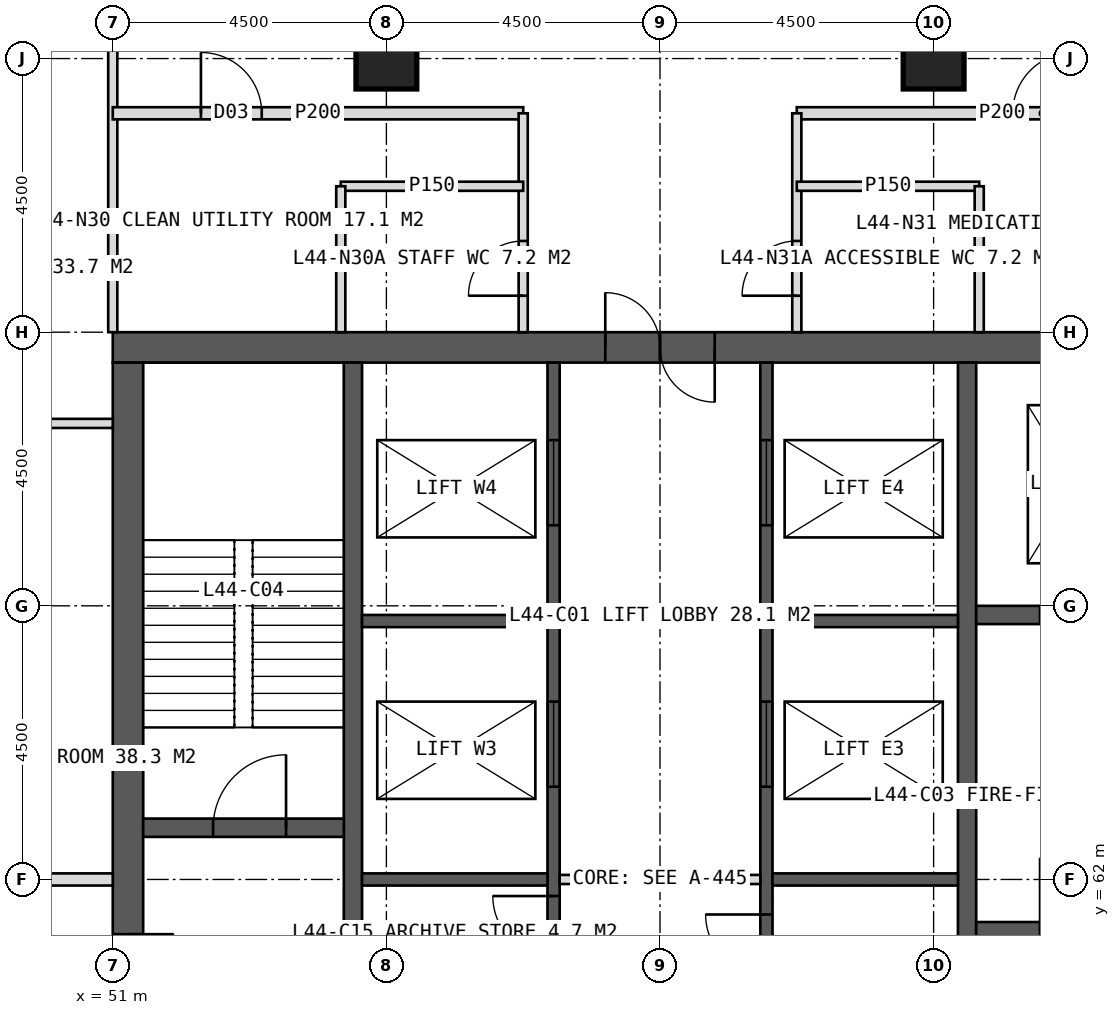
"""IFC4 building model, lengths in metres.
Left out: names, types, materials, properties, quantities, classifications, styles, units other than length and angle.
Written with IfcOpenShell. Run it as: python <this file> out.ifc"""

import sys

from ifc_helpers import new_model, si_unit, direction, frame, frame_2d, origin, origin_2d, place, context, subcontext, project, spatial, rectangle, hollow_rectangle, extrude, element, fill, save


model = new_model("IFC4")
c1 = context("Model", 3, precision=1e-05, world=origin(), true_north=direction((0.0, 1.0)))
c2 = subcontext(c1, "Body", "Model", "MODEL_VIEW")
j1 = project(units=[si_unit("LENGTHUNIT", "METRE"), si_unit("PLANEANGLEUNIT", "RADIAN")], contexts=[c1])
p1 = place(None, origin())
s1 = spatial("IfcSite", under=j1, at=p1, CompositionType="ELEMENT")
p2 = place(p1, origin())
s2 = spatial("IfcBuilding", under=s1, at=p2, CompositionType="ELEMENT")
p3 = place(p2, frame((0.0, 0.0, 185.0)))
s3 = spatial("IfcBuildingStorey", under=s2, at=p3, CompositionType="ELEMENT", Elevation=185.0)
p4 = place(p3, frame((51.0, 70.75, 0.0), z_axis=(0.0, 0.0, 1.0), x_axis=(1.0, 0.0, 0.0)))
e1 = element("IfcWall", 1, at=p4, inside=s3, PredefinedType="SHEAR", context=c2, shape_type="SweptSolid", body=[
    extrude(rectangle(XDim=18.0, YDim=0.5, at=frame_2d((9.0, 0.0))), origin(), (0.0, 0.0, 1.0), 4.0),
])
p5 = place(p4, frame((8.1, 0.0, 0.0)))
e2 = element("IfcOpeningElement", 2, at=p5, cuts=e1, PredefinedType="OPENING", context=c2, shape_type="SweptSolid", body=[
    extrude(rectangle(XDim=1.8, YDim=2.2, at=frame_2d((0.9, 1.1))), frame((0.0, 0.26, 0.0), z_axis=(0.0, -1.0, 0.0), x_axis=(1.0, 0.0, 0.0)), (0.0, 0.0, 1.0), 0.52),
])
p6 = place(p3, frame((51.25, 53.5, 0.0), z_axis=(0.0, 0.0, 1.0), x_axis=(0.0, 1.0, 0.0)))
e3 = element("IfcWall", 3, at=p6, inside=s3, PredefinedType="SHEAR", context=c2, shape_type="SweptSolid", body=[
    extrude(rectangle(XDim=17.0, YDim=0.5, at=frame_2d((8.5, 0.0))), origin(), (0.0, 0.0, 1.0), 4.0),
])
p7 = place(p6, frame((6.1, 0.0, 0.0)))
e4 = element("IfcOpeningElement", 4, at=p7, cuts=e3, PredefinedType="OPENING", context=c2, shape_type="SweptSolid", body=[
    extrude(rectangle(XDim=1.5, YDim=2.2, at=frame_2d((0.75, 1.1))), frame((0.0, 0.26, 0.0), z_axis=(0.0, -1.0, 0.0), x_axis=(1.0, 0.0, 0.0)), (0.0, 0.0, 1.0), 0.52),
])
for number, where, z_axis, x_axis in (
    (5, (54.95, 53.5, 0.0), (0.0, 0.0, 1.0), (0.0, 1.0, 0.0)),
    (6, (65.05, 53.5, 0.0), (0.0, 0.0, 1.0), (0.0, 1.0, 0.0)),
):
    element("IfcWall", number, at=place(p3, frame(where, z_axis=z_axis, x_axis=x_axis)), inside=s3, PredefinedType="SHEAR", context=c2, shape_type="SweptSolid", body=[
        extrude(rectangle(XDim=17.0, YDim=0.3, at=frame_2d((8.5, 0.0))), origin(), (0.0, 0.0, 1.0), 4.0),
    ])
p8 = place(p3, frame((58.25, 53.5, 0.0), z_axis=(0.0, 0.0, 1.0), x_axis=(0.0, 1.0, 0.0)))
e7 = element("IfcWall", 7, at=p8, inside=s3, PredefinedType="SHEAR", context=c2, shape_type="SweptSolid", body=[
    extrude(rectangle(XDim=17.0, YDim=0.2, at=frame_2d((8.5, 0.0))), origin(), (0.0, 0.0, 1.0), 4.0),
])
p9 = place(p8, frame((0.393, 0.0, 0.0)))
e8 = element("IfcOpeningElement", 8, at=p9, cuts=e7, PredefinedType="OPENING", context=c2, shape_type="SweptSolid", body=[
    extrude(rectangle(XDim=1.0, YDim=2.1, at=frame_2d((0.5, 1.05))), frame((0.0, 0.11, 0.0), z_axis=(0.0, -1.0, 0.0), x_axis=(1.0, 0.0, 0.0)), (0.0, 0.0, 1.0), 0.22),
])
p10 = place(p8, frame((2.542, 0.0, 0.0)))
e9 = element("IfcOpeningElement", 9, at=p10, cuts=e7, PredefinedType="OPENING", context=c2, shape_type="SweptSolid", body=[
    extrude(rectangle(XDim=1.0, YDim=2.1, at=frame_2d((0.5, 1.05))), frame((0.0, 0.11, 0.0), z_axis=(0.0, -1.0, 0.0), x_axis=(1.0, 0.0, 0.0)), (0.0, 0.0, 1.0), 0.22),
])
p11 = place(p8, frame((5.127, 0.0, 0.0)))
e10 = element("IfcOpeningElement", 10, at=p11, cuts=e7, PredefinedType="OPENING", context=c2, shape_type="SweptSolid", body=[
    extrude(rectangle(XDim=1.0, YDim=2.1, at=frame_2d((0.5, 1.05))), frame((0.0, 0.11, 0.0), z_axis=(0.0, -1.0, 0.0), x_axis=(1.0, 0.0, 0.0)), (0.0, 0.0, 1.0), 0.22),
])
p12 = place(p8, frame((7.228, 0.0, 0.0)))
e11 = element("IfcOpeningElement", 11, at=p12, cuts=e7, PredefinedType="OPENING", context=c2, shape_type="SweptSolid", body=[
    extrude(rectangle(XDim=1.0, YDim=2.1, at=frame_2d((0.5, 1.05))), frame((0.0, 0.11, 0.0), z_axis=(0.0, -1.0, 0.0), x_axis=(1.0, 0.0, 0.0)), (0.0, 0.0, 1.0), 0.22),
])
p13 = place(p8, frame((10.025, 0.0, 0.0)))
e12 = element("IfcOpeningElement", 12, at=p13, cuts=e7, PredefinedType="OPENING", context=c2, shape_type="SweptSolid", body=[
    extrude(rectangle(XDim=1.4, YDim=2.2, at=frame_2d((0.7, 1.1))), frame((0.0, 0.11, 0.0), z_axis=(0.0, -1.0, 0.0), x_axis=(1.0, 0.0, 0.0)), (0.0, 0.0, 1.0), 0.22),
])
p14 = place(p8, frame((14.325, 0.0, 0.0)))
e13 = element("IfcOpeningElement", 13, at=p14, cuts=e7, PredefinedType="OPENING", context=c2, shape_type="SweptSolid", body=[
    extrude(rectangle(XDim=1.4, YDim=2.2, at=frame_2d((0.7, 1.1))), frame((0.0, 0.11, 0.0), z_axis=(0.0, -1.0, 0.0), x_axis=(1.0, 0.0, 0.0)), (0.0, 0.0, 1.0), 0.22),
])
p15 = place(p3, frame((61.75, 53.5, 0.0), z_axis=(0.0, 0.0, 1.0), x_axis=(0.0, 1.0, 0.0)))
e14 = element("IfcWall", 14, at=p15, inside=s3, PredefinedType="SHEAR", context=c2, shape_type="SweptSolid", body=[
    extrude(rectangle(XDim=17.0, YDim=0.2, at=frame_2d((8.5, 0.0))), origin(), (0.0, 0.0, 1.0), 4.0),
])
p16 = place(p15, frame((0.6, 0.0, 0.0)))
e15 = element("IfcOpeningElement", 15, at=p16, cuts=e14, PredefinedType="OPENING", context=c2, shape_type="SweptSolid", body=[
    extrude(rectangle(XDim=1.0, YDim=2.1, at=frame_2d((0.5, 1.05))), frame((0.0, 0.11, 0.0), z_axis=(0.0, -1.0, 0.0), x_axis=(1.0, 0.0, 0.0)), (0.0, 0.0, 1.0), 0.22),
])
p17 = place(p15, frame((2.75, 0.0, 0.0)))
e16 = element("IfcOpeningElement", 16, at=p17, cuts=e14, PredefinedType="OPENING", context=c2, shape_type="SweptSolid", body=[
    extrude(rectangle(XDim=1.0, YDim=2.1, at=frame_2d((0.5, 1.05))), frame((0.0, 0.11, 0.0), z_axis=(0.0, -1.0, 0.0), x_axis=(1.0, 0.0, 0.0)), (0.0, 0.0, 1.0), 0.22),
])
p18 = place(p15, frame((4.824, 0.0, 0.0)))
e17 = element("IfcOpeningElement", 17, at=p18, cuts=e14, PredefinedType="OPENING", context=c2, shape_type="SweptSolid", body=[
    extrude(rectangle(XDim=1.0, YDim=2.1, at=frame_2d((0.5, 1.05))), frame((0.0, 0.11, 0.0), z_axis=(0.0, -1.0, 0.0), x_axis=(1.0, 0.0, 0.0)), (0.0, 0.0, 1.0), 0.22),
])
p19 = place(p15, frame((6.924, 0.0, 0.0)))
e18 = element("IfcOpeningElement", 18, at=p19, cuts=e14, PredefinedType="OPENING", context=c2, shape_type="SweptSolid", body=[
    extrude(rectangle(XDim=1.0, YDim=2.1, at=frame_2d((0.5, 1.05))), frame((0.0, 0.11, 0.0), z_axis=(0.0, -1.0, 0.0), x_axis=(1.0, 0.0, 0.0)), (0.0, 0.0, 1.0), 0.22),
])
p20 = place(p15, frame((10.025, 0.0, 0.0)))
e19 = element("IfcOpeningElement", 19, at=p20, cuts=e14, PredefinedType="OPENING", context=c2, shape_type="SweptSolid", body=[
    extrude(rectangle(XDim=1.4, YDim=2.2, at=frame_2d((0.7, 1.1))), frame((0.0, 0.11, 0.0), z_axis=(0.0, -1.0, 0.0), x_axis=(1.0, 0.0, 0.0)), (0.0, 0.0, 1.0), 0.22),
])
p21 = place(p15, frame((14.325, 0.0, 0.0)))
e20 = element("IfcOpeningElement", 20, at=p21, cuts=e14, PredefinedType="OPENING", context=c2, shape_type="SweptSolid", body=[
    extrude(rectangle(XDim=1.4, YDim=2.2, at=frame_2d((0.7, 1.1))), frame((0.0, 0.11, 0.0), z_axis=(0.0, -1.0, 0.0), x_axis=(1.0, 0.0, 0.0)), (0.0, 0.0, 1.0), 0.22),
])
for number, where, z_axis, x_axis in (
    (21, (55.1, 62.0, 0.0), (0.0, 0.0, 1.0), (1.0, 0.0, 0.0)),
    (22, (61.85, 62.0, 0.0), (0.0, 0.0, 1.0), (1.0, 0.0, 0.0)),
    (23, (55.1, 66.25, 0.0), (0.0, 0.0, 1.0), (1.0, 0.0, 0.0)),
    (24, (61.85, 66.25, 0.0), (0.0, 0.0, 1.0), (1.0, 0.0, 0.0)),
):
    element("IfcWall", number, at=place(p3, frame(where, z_axis=z_axis, x_axis=x_axis)), inside=s3, PredefinedType="SHEAR", context=c2, shape_type="SweptSolid", body=[
        extrude(rectangle(XDim=3.05, YDim=0.2, at=frame_2d((1.525, 0.0))), origin(), (0.0, 0.0, 1.0), 4.0),
    ])
p22 = place(p3, frame((51.5, 62.85, 0.0), z_axis=(0.0, 0.0, 1.0), x_axis=(1.0, 0.0, 0.0)))
e25 = element("IfcWall", 25, at=p22, inside=s3, PredefinedType="SHEAR", context=c2, shape_type="SweptSolid", body=[
    extrude(rectangle(XDim=3.3, YDim=0.3, at=frame_2d((1.65, 0.0))), origin(), (0.0, 0.0, 1.0), 4.0),
])
p23 = place(p22, frame((1.15, 0.0, 0.0)))
e26 = element("IfcOpeningElement", 26, at=p23, cuts=e25, PredefinedType="OPENING", context=c2, shape_type="SweptSolid", body=[
    extrude(rectangle(XDim=1.2, YDim=2.1, at=frame_2d((0.6, 1.05))), frame((0.0, 0.16, 0.0), z_axis=(0.0, -1.0, 0.0), x_axis=(1.0, 0.0, 0.0)), (0.0, 0.0, 1.0), 0.32),
])
p24 = place(p3, frame((65.2, 61.15, 0.0), z_axis=(0.0, 0.0, 1.0), x_axis=(1.0, 0.0, 0.0)))
e27 = element("IfcWall", 27, at=p24, inside=s3, PredefinedType="SHEAR", context=c2, shape_type="SweptSolid", body=[
    extrude(rectangle(XDim=3.3, YDim=0.3, at=frame_2d((1.65, 0.0))), origin(), (0.0, 0.0, 1.0), 4.0),
])
p25 = place(p24, frame((1.05, 0.0, 0.0)))
e28 = element("IfcOpeningElement", 28, at=p25, cuts=e27, PredefinedType="OPENING", context=c2, shape_type="SweptSolid", body=[
    extrude(rectangle(XDim=1.2, YDim=2.1, at=frame_2d((0.6, 1.05))), frame((0.0, 0.16, 0.0), z_axis=(0.0, -1.0, 0.0), x_axis=(1.0, 0.0, 0.0)), (0.0, 0.0, 1.0), 0.32),
])
p26 = place(p3, frame((65.2, 66.35, 0.0), z_axis=(0.0, 0.0, 1.0), x_axis=(1.0, 0.0, 0.0)))
e29 = element("IfcWall", 29, at=p26, inside=s3, PredefinedType="SHEAR", context=c2, shape_type="SweptSolid", body=[
    extrude(rectangle(XDim=3.3, YDim=0.3, at=frame_2d((1.65, 0.0))), origin(), (0.0, 0.0, 1.0), 4.0),
])
p27 = place(p26, frame((1.05, 0.0, 0.0)))
e30 = element("IfcOpeningElement", 30, at=p27, cuts=e29, PredefinedType="OPENING", context=c2, shape_type="SweptSolid", body=[
    extrude(rectangle(XDim=1.2, YDim=2.2, at=frame_2d((0.6, 1.1))), frame((0.0, 0.16, 0.0), z_axis=(0.0, -1.0, 0.0), x_axis=(1.0, 0.0, 0.0)), (0.0, 0.0, 1.0), 0.32),
])
for number, where, z_axis, x_axis in (
    (31, (55.5, 75.5, 0.0), (0.0, 0.0, 1.0), (1.0, 0.0, 0.0)),
    (32, (64.5, 75.5, 0.0), (0.0, 0.0, 1.0), (1.0, 0.0, 0.0)),
):
    element("IfcColumn", number, at=place(p3, frame(where, z_axis=z_axis, x_axis=x_axis)), inside=s3, PredefinedType="COLUMN", context=c2, shape_type="SweptSolid", body=[
        extrude(hollow_rectangle(XDim=1.0, YDim=1.0, WallThickness=0.1, at=origin_2d()), origin(), (0.0, 0.0, 1.0), 4.0),
    ])
p28 = place(p3, frame((51.0, 71.0, 0.0), z_axis=(0.0, 0.0, 1.0), x_axis=(0.0, 1.0, 0.0)))
e33 = element("IfcWall", 33, at=p28, inside=s3, PredefinedType="PARTITIONING", context=c2, shape_type="SweptSolid", body=[
    extrude(rectangle(XDim=5.1, YDim=0.15, at=frame_2d((2.55, 0.0))), origin(), (0.0, 0.0, 1.0), 3.75),
])
p29 = place(p3, frame((51.0, 74.6, 0.0), z_axis=(0.0, 0.0, 1.0), x_axis=(1.0, 0.0, 0.0)))
e34 = element("IfcWall", 34, at=p29, inside=s3, PredefinedType="PARTITIONING", context=c2, shape_type="SweptSolid", body=[
    extrude(rectangle(XDim=6.75, YDim=0.2, at=frame_2d((3.375, 0.0))), origin(), (0.0, 0.0, 1.0), 3.75),
])
p30 = place(p29, frame((1.45, 0.0, 0.0)))
e35 = element("IfcOpeningElement", 35, at=p30, cuts=e34, PredefinedType="OPENING", context=c2, shape_type="SweptSolid", body=[
    extrude(rectangle(XDim=1.0, YDim=2.1, at=frame_2d((0.5, 1.05))), frame((0.0, 0.11, 0.0), z_axis=(0.0, -1.0, 0.0), x_axis=(1.0, 0.0, 0.0)), (0.0, 0.0, 1.0), 0.22),
])
p31 = place(p3, frame((62.25, 74.6, 0.0), z_axis=(0.0, 0.0, 1.0), x_axis=(1.0, 0.0, 0.0)))
e36 = element("IfcWall", 36, at=p31, inside=s3, PredefinedType="PARTITIONING", context=c2, shape_type="SweptSolid", body=[
    extrude(rectangle(XDim=6.75, YDim=0.2, at=frame_2d((3.375, 0.0))), origin(), (0.0, 0.0, 1.0), 3.75),
])
p32 = place(p31, frame((3.55, 0.0, 0.0)))
e37 = element("IfcOpeningElement", 37, at=p32, cuts=e36, PredefinedType="OPENING", context=c2, shape_type="SweptSolid", body=[
    extrude(rectangle(XDim=1.0, YDim=2.1, at=frame_2d((0.5, 1.05))), frame((0.0, 0.11, 0.0), z_axis=(0.0, -1.0, 0.0), x_axis=(1.0, 0.0, 0.0)), (0.0, 0.0, 1.0), 0.22),
])
p33 = place(p3, frame((57.75, 71.0, 0.0), z_axis=(0.0, 0.0, 1.0), x_axis=(0.0, 1.0, 0.0)))
e38 = element("IfcWall", 38, at=p33, inside=s3, PredefinedType="PARTITIONING", context=c2, shape_type="SweptSolid", body=[
    extrude(rectangle(XDim=3.6, YDim=0.15, at=frame_2d((1.8, 0.0))), origin(), (0.0, 0.0, 1.0), 3.75),
])
p34 = place(p33, frame((0.6, 0.0, 0.0)))
e39 = element("IfcOpeningElement", 39, at=p34, cuts=e38, PredefinedType="OPENING", context=c2, shape_type="SweptSolid", body=[
    extrude(rectangle(XDim=0.9, YDim=2.1, at=frame_2d((0.45, 1.05))), frame((0.0, 0.085, 0.0), z_axis=(0.0, -1.0, 0.0), x_axis=(1.0, 0.0, 0.0)), (0.0, 0.0, 1.0), 0.17),
])
p35 = place(p3, frame((62.25, 71.0, 0.0), z_axis=(0.0, 0.0, 1.0), x_axis=(0.0, 1.0, 0.0)))
e40 = element("IfcWall", 40, at=p35, inside=s3, PredefinedType="PARTITIONING", context=c2, shape_type="SweptSolid", body=[
    extrude(rectangle(XDim=3.6, YDim=0.15, at=frame_2d((1.8, 0.0))), origin(), (0.0, 0.0, 1.0), 3.75),
])
p36 = place(p35, frame((0.6, 0.0, 0.0)))
e41 = element("IfcOpeningElement", 41, at=p36, cuts=e40, PredefinedType="OPENING", context=c2, shape_type="SweptSolid", body=[
    extrude(rectangle(XDim=0.9, YDim=2.1, at=frame_2d((0.45, 1.05))), frame((0.0, 0.085, 0.0), z_axis=(0.0, -1.0, 0.0), x_axis=(1.0, 0.0, 0.0)), (0.0, 0.0, 1.0), 0.17),
])
p37 = place(p3, frame((54.75, 73.4, 0.0), z_axis=(0.0, 0.0, 1.0), x_axis=(1.0, 0.0, 0.0)))
e42 = element("IfcWall", 42, at=p37, inside=s3, PredefinedType="PARTITIONING", context=c2, shape_type="SweptSolid", body=[
    extrude(rectangle(XDim=3.0, YDim=0.15, at=frame_2d((1.5, 0.0))), origin(), (0.0, 0.0, 1.0), 3.75),
])
p38 = place(p3, frame((54.75, 71.0, 0.0), z_axis=(0.0, 0.0, 1.0), x_axis=(0.0, 1.0, 0.0)))
e43 = element("IfcWall", 43, at=p38, inside=s3, PredefinedType="PARTITIONING", context=c2, shape_type="SweptSolid", body=[
    extrude(rectangle(XDim=2.4, YDim=0.15, at=frame_2d((1.2, 0.0))), origin(), (0.0, 0.0, 1.0), 3.75),
])
p39 = place(p3, frame((62.25, 73.4, 0.0), z_axis=(0.0, 0.0, 1.0), x_axis=(1.0, 0.0, 0.0)))
e44 = element("IfcWall", 44, at=p39, inside=s3, PredefinedType="PARTITIONING", context=c2, shape_type="SweptSolid", body=[
    extrude(rectangle(XDim=3.0, YDim=0.15, at=frame_2d((1.5, 0.0))), origin(), (0.0, 0.0, 1.0), 3.75),
])
p40 = place(p3, frame((65.25, 71.0, 0.0), z_axis=(0.0, 0.0, 1.0), x_axis=(0.0, 1.0, 0.0)))
e45 = element("IfcWall", 45, at=p40, inside=s3, PredefinedType="PARTITIONING", context=c2, shape_type="SweptSolid", body=[
    extrude(rectangle(XDim=2.4, YDim=0.15, at=frame_2d((1.2, 0.0))), origin(), (0.0, 0.0, 1.0), 3.75),
])
p41 = place(p3, frame((51.0, 62.0, 0.0), z_axis=(0.0, 0.0, 1.0), x_axis=(-1.0, 0.0, 0.0)))
e46 = element("IfcWall", 46, at=p41, inside=s3, PredefinedType="SOLIDWALL", context=c2, shape_type="SweptSolid", body=[
    extrude(rectangle(XDim=5.1, YDim=0.2, at=frame_2d((2.55, 0.0))), origin(), (0.0, 0.0, 1.0), 2.95),
])
p42 = place(p3, frame((51.0, 69.5, 0.0), z_axis=(0.0, 0.0, 1.0), x_axis=(-1.0, 0.0, 0.0)))
e47 = element("IfcWall", 47, at=p42, inside=s3, PredefinedType="PARTITIONING", context=c2, shape_type="SweptSolid", body=[
    extrude(rectangle(XDim=5.1, YDim=0.15, at=frame_2d((2.55, 0.0))), origin(), (0.0, 0.0, 1.0), 3.75),
])
p43 = place(p3, frame((58.35, 62.0, 0.0), z_axis=(0.0, 0.0, 1.0), x_axis=(1.0, 0.0, 0.0)))
e48 = element("IfcWall", 48, at=p43, inside=s3, PredefinedType="PARTITIONING", context=c2, shape_type="SweptSolid", body=[
    extrude(rectangle(XDim=3.3, YDim=0.15, at=frame_2d((1.65, 0.0))), origin(), (0.0, 0.0, 1.0), 3.75),
])
p44 = place(p34, origin())
e49 = element("IfcDoor", 49, at=p44, inside=s3, OperationType="SINGLE_SWING_LEFT", PredefinedType="DOOR", context=c2, shape_type="SweptSolid", body=[
    extrude(rectangle(XDim=0.9, YDim=2.1, at=frame_2d((0.45, 1.05))), frame((0.0, 0.025, 0.0), z_axis=(0.0, -1.0, 0.0), x_axis=(1.0, 0.0, 0.0)), (0.0, 0.0, 1.0), 0.05),
])
fill(e39, e49)
p45 = place(p30, origin())
e50 = element("IfcDoor", 50, at=p45, inside=s3, OperationType="SINGLE_SWING_LEFT", PredefinedType="DOOR", context=c2, shape_type="SweptSolid", body=[
    extrude(rectangle(XDim=1.0, YDim=2.1, at=frame_2d((0.5, 1.05))), frame((0.0, 0.025, 0.0), z_axis=(0.0, -1.0, 0.0), x_axis=(1.0, 0.0, 0.0)), (0.0, 0.0, 1.0), 0.05),
])
fill(e35, e50)
p46 = place(p36, origin())
e51 = element("IfcDoor", 51, at=p46, inside=s3, OperationType="SINGLE_SWING_LEFT", PredefinedType="DOOR", context=c2, shape_type="SweptSolid", body=[
    extrude(rectangle(XDim=0.9, YDim=2.1, at=frame_2d((0.45, 1.05))), frame((0.0, 0.025, 0.0), z_axis=(0.0, -1.0, 0.0), x_axis=(1.0, 0.0, 0.0)), (0.0, 0.0, 1.0), 0.05),
])
fill(e41, e51)
p47 = place(p32, origin())
e52 = element("IfcDoor", 52, at=p47, inside=s3, OperationType="SINGLE_SWING_RIGHT", PredefinedType="DOOR", context=c2, shape_type="SweptSolid", body=[
    extrude(rectangle(XDim=1.0, YDim=2.1, at=frame_2d((0.5, 1.05))), frame((0.0, 0.025, 0.0), z_axis=(0.0, -1.0, 0.0), x_axis=(1.0, 0.0, 0.0)), (0.0, 0.0, 1.0), 0.05),
])
fill(e37, e52)
p48 = place(p5, origin())
e53 = element("IfcDoor", 53, at=p48, inside=s3, OperationType="DOUBLE_DOOR_SINGLE_SWING", PredefinedType="DOOR", context=c2, shape_type="SweptSolid", body=[
    extrude(rectangle(XDim=1.8, YDim=2.2, at=frame_2d((0.9, 1.1))), frame((0.0, 0.025, 0.0), z_axis=(0.0, -1.0, 0.0), x_axis=(1.0, 0.0, 0.0)), (0.0, 0.0, 1.0), 0.05),
])
fill(e2, e53)
p49 = place(p7, origin())
e54 = element("IfcDoor", 54, at=p49, inside=s3, OperationType="DOUBLE_DOOR_SINGLE_SWING", PredefinedType="DOOR", context=c2, shape_type="SweptSolid", body=[
    extrude(rectangle(XDim=1.5, YDim=2.2, at=frame_2d((0.75, 1.1))), frame((0.0, 0.025, 0.0), z_axis=(0.0, -1.0, 0.0), x_axis=(1.0, 0.0, 0.0)), (0.0, 0.0, 1.0), 0.05),
])
fill(e4, e54)
p50 = place(p23, origin())
e55 = element("IfcDoor", 55, at=p50, inside=s3, OperationType="SINGLE_SWING_RIGHT", PredefinedType="DOOR", context=c2, shape_type="SweptSolid", body=[
    extrude(rectangle(XDim=1.2, YDim=2.1, at=frame_2d((0.6, 1.05))), frame((0.0, 0.025, 0.0), z_axis=(0.0, -1.0, 0.0), x_axis=(1.0, 0.0, 0.0)), (0.0, 0.0, 1.0), 0.05),
])
fill(e26, e55)
p51 = place(p12, origin())
e56 = element("IfcDoor", 56, at=p51, inside=s3, OperationType="SINGLE_SWING_RIGHT", PredefinedType="DOOR", context=c2, shape_type="SweptSolid", body=[
    extrude(rectangle(XDim=1.0, YDim=2.1, at=frame_2d((0.5, 1.05))), frame((0.0, 0.025, 0.0), z_axis=(0.0, -1.0, 0.0), x_axis=(1.0, 0.0, 0.0)), (0.0, 0.0, 1.0), 0.05),
])
fill(e11, e56)
p52 = place(p19, origin())
e57 = element("IfcDoor", 57, at=p52, inside=s3, OperationType="SINGLE_SWING_RIGHT", PredefinedType="DOOR", context=c2, shape_type="SweptSolid", body=[
    extrude(rectangle(XDim=1.0, YDim=2.1, at=frame_2d((0.5, 1.05))), frame((0.0, 0.025, 0.0), z_axis=(0.0, -1.0, 0.0), x_axis=(1.0, 0.0, 0.0)), (0.0, 0.0, 1.0), 0.05),
])
fill(e18, e57)
p53 = place(p13, origin())
e58 = element("IfcDoor", 58, at=p53, inside=s3, OperationType="SLIDING_TO_LEFT", PredefinedType="DOOR", context=c2, shape_type="SweptSolid", body=[
    extrude(rectangle(XDim=1.4, YDim=2.2, at=frame_2d((0.7, 1.1))), frame((0.0, 0.025, 0.0), z_axis=(0.0, -1.0, 0.0), x_axis=(1.0, 0.0, 0.0)), (0.0, 0.0, 1.0), 0.05),
])
fill(e12, e58)
p54 = place(p20, origin())
e59 = element("IfcDoor", 59, at=p54, inside=s3, OperationType="SLIDING_TO_LEFT", PredefinedType="DOOR", context=c2, shape_type="SweptSolid", body=[
    extrude(rectangle(XDim=1.4, YDim=2.2, at=frame_2d((0.7, 1.1))), frame((0.0, 0.025, 0.0), z_axis=(0.0, -1.0, 0.0), x_axis=(1.0, 0.0, 0.0)), (0.0, 0.0, 1.0), 0.05),
])
fill(e19, e59)
p55 = place(p14, origin())
e60 = element("IfcDoor", 60, at=p55, inside=s3, OperationType="SLIDING_TO_LEFT", PredefinedType="DOOR", context=c2, shape_type="SweptSolid", body=[
    extrude(rectangle(XDim=1.4, YDim=2.2, at=frame_2d((0.7, 1.1))), frame((0.0, 0.025, 0.0), z_axis=(0.0, -1.0, 0.0), x_axis=(1.0, 0.0, 0.0)), (0.0, 0.0, 1.0), 0.05),
])
fill(e13, e60)
p56 = place(p21, origin())
e61 = element("IfcDoor", 61, at=p56, inside=s3, OperationType="SLIDING_TO_LEFT", PredefinedType="DOOR", context=c2, shape_type="SweptSolid", body=[
    extrude(rectangle(XDim=1.4, YDim=2.2, at=frame_2d((0.7, 1.1))), frame((0.0, 0.025, 0.0), z_axis=(0.0, -1.0, 0.0), x_axis=(1.0, 0.0, 0.0)), (0.0, 0.0, 1.0), 0.05),
])
fill(e20, e61)
save(model, sys.argv[1])
